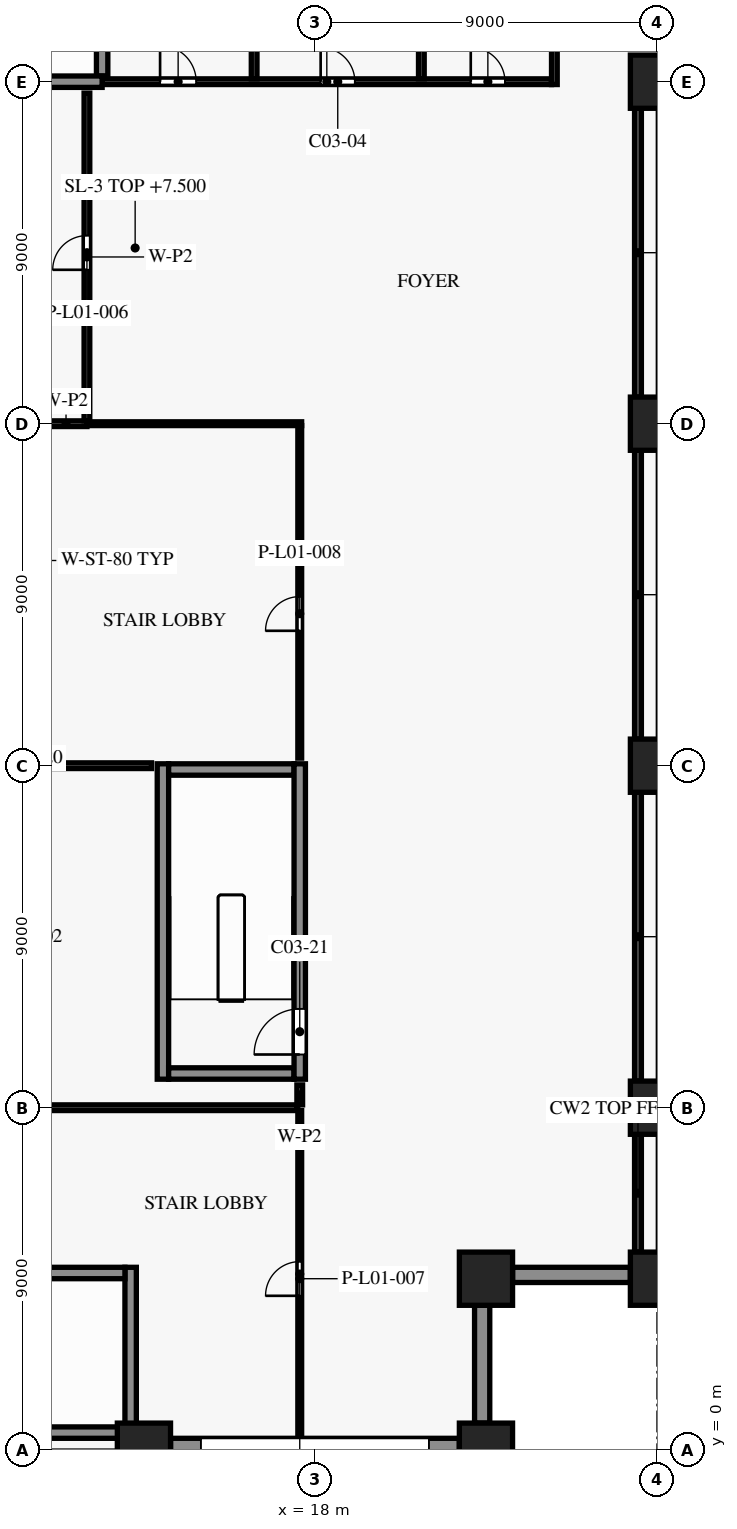
"""IFC4 building model, lengths in metres.
Left out: names, types, materials, properties, quantities, classifications, styles, units other than length and angle.
Written with IfcOpenShell. Run it as: python <this file> out.ifc"""

import sys

from ifc_helpers import new_model, si_unit, direction, frame, frame_2d, origin, origin_2d, place, context, subcontext, project, spatial, rectangle, extrude, element, fill, save


model = new_model("IFC4")
c1 = context("Model", 3, precision=1e-05, world=origin(), true_north=direction((0.0, 1.0)))
c2 = subcontext(c1, "Body", "Model", "MODEL_VIEW")
j1 = project(units=[si_unit("LENGTHUNIT", "METRE"), si_unit("PLANEANGLEUNIT", "RADIAN")], contexts=[c1])
p1 = place(None, origin())
s1 = spatial("IfcSite", under=j1, at=p1, CompositionType="ELEMENT")
p2 = place(p1, origin())
s2 = spatial("IfcBuilding", under=s1, at=p2, CompositionType="ELEMENT")
p3 = place(p2, frame((0.0, 0.0, 7.5)))
s3 = spatial("IfcBuildingStorey", under=s2, at=p3, CompositionType="ELEMENT", Elevation=7.5)
for number, where, z_axis, x_axis in (
    (1, (13.5, 0.0, 0.0), (0.0, 0.0, 1.0), (1.0, 0.0, 0.0)),
    (2, (22.5, 0.0, 0.0), (0.0, 0.0, 1.0), (1.0, 0.0, 0.0)),
    (3, (27.0, 4.5, 0.0), (0.0, 0.0, 1.0), (1.0, 0.0, 0.0)),
    (4, (27.0, 9.0, 0.0), (0.0, 0.0, 1.0), (1.0, 0.0, 0.0)),
    (5, (27.0, 18.0, 0.0), (0.0, 0.0, 1.0), (1.0, 0.0, 0.0)),
    (6, (27.0, 27.0, 0.0), (0.0, 0.0, 1.0), (1.0, 0.0, 0.0)),
    (7, (27.0, 36.0, 0.0), (0.0, 0.0, 1.0), (1.0, 0.0, 0.0)),
    (8, (22.5, 4.5, 0.0), (0.0, 0.0, 1.0), (1.0, 0.0, 0.0)),
):
    element("IfcColumn", number, at=place(p3, frame(where, z_axis=z_axis, x_axis=x_axis)), inside=s3, PredefinedType="COLUMN", context=c2, shape_type="SweptSolid", body=[
        extrude(rectangle(XDim=1.4, YDim=1.4, at=origin_2d()), origin(), (0.0, 0.0, 1.0), 7.0),
    ])
p4 = place(p3, frame((21.8, 0.1, 0.0), z_axis=(0.0, 0.0, 1.0), x_axis=(-1.0, 0.0, 0.0)))
e9 = element("IfcWall", 9, at=p4, inside=s3, PredefinedType="SOLIDWALL", context=c2, shape_type="SweptSolid", body=[
    extrude(rectangle(XDim=7.6, YDim=0.4, at=frame_2d((3.8, 0.0))), origin(), (0.0, 0.0, 1.0), 6.1),
])
p5 = place(p4, frame((0.8, 0.0, 0.9)))
e10 = element("IfcOpeningElement", 10, at=p5, cuts=e9, PredefinedType="OPENING", context=c2, shape_type="SweptSolid", body=[
    extrude(rectangle(XDim=6.0, YDim=1.8, at=frame_2d((3.0, 0.9))), frame((0.0, 0.21, 0.0), z_axis=(0.0, -1.0, 0.0), x_axis=(1.0, 0.0, 0.0)), (0.0, 0.0, 1.0), 0.42),
])
for number, where, z_axis, x_axis in (
    (11, (22.4, 3.8, 0.0), (0.0, 0.0, 1.0), (0.0, -1.0, 0.0)),
    (12, (26.3, 4.6, 0.0), (0.0, 0.0, 1.0), (-1.0, 0.0, 0.0)),
):
    element("IfcWall", number, at=place(p3, frame(where, z_axis=z_axis, x_axis=x_axis)), inside=s3, PredefinedType="SOLIDWALL", context=c2, shape_type="SweptSolid", body=[
        extrude(rectangle(XDim=3.1, YDim=0.4, at=frame_2d((1.55, 0.0))), origin(), (0.0, 0.0, 1.0), 6.1),
    ])
p6 = place(p3, frame((5.0, 0.45, 0.0), z_axis=(0.0, 0.0, 1.0), x_axis=(1.0, 0.0, 0.0)))
e13 = element("IfcWall", 13, at=p6, inside=s3, PredefinedType="SHEAR", context=c2, shape_type="SweptSolid", body=[
    extrude(rectangle(XDim=8.0, YDim=0.3, at=frame_2d((4.0, 0.0))), origin(), (0.0, 0.0, 1.0), 6.7),
])
p7 = place(p3, frame((5.0, 4.65, 0.0), z_axis=(0.0, 0.0, 1.0), x_axis=(1.0, 0.0, 0.0)))
e14 = element("IfcWall", 14, at=p7, inside=s3, PredefinedType="SHEAR", context=c2, shape_type="SweptSolid", body=[
    extrude(rectangle(XDim=8.0, YDim=0.3, at=frame_2d((4.0, 0.0))), origin(), (0.0, 0.0, 1.0), 6.7),
])
p8 = place(p7, frame((0.5, 0.0, 0.0)))
e15 = element("IfcOpeningElement", 15, at=p8, cuts=e14, PredefinedType="OPENING", context=c2, shape_type="SweptSolid", body=[
    extrude(rectangle(XDim=1.2, YDim=2.2, at=frame_2d((0.6, 1.1))), frame((0.0, 0.16, 0.0), z_axis=(0.0, -1.0, 0.0), x_axis=(1.0, 0.0, 0.0)), (0.0, 0.0, 1.0), 0.32),
])
for number, where, z_axis, x_axis in (
    (16, (14.15, 9.9, 0.0), (0.0, 0.0, 1.0), (1.0, 0.0, 0.0)),
    (17, (14.15, 17.9, 0.0), (0.0, 0.0, 1.0), (1.0, 0.0, 0.0)),
):
    element("IfcWall", number, at=place(p3, frame(where, z_axis=z_axis, x_axis=x_axis)), inside=s3, PredefinedType="SHEAR", context=c2, shape_type="SweptSolid", body=[
        extrude(rectangle(XDim=3.3, YDim=0.3, at=frame_2d((1.65, 0.0))), origin(), (0.0, 0.0, 1.0), 6.7),
    ])
p9 = place(p3, frame((12.4, 36.0, 0.0), z_axis=(0.0, 0.0, 1.0), x_axis=(1.0, 0.0, 0.0)))
e18 = element("IfcWall", 18, at=p9, inside=s3, PredefinedType="SHEAR", context=c2, shape_type="SweptSolid", body=[
    extrude(rectangle(XDim=11.825, YDim=0.15, at=frame_2d((5.913, 0.0))), origin(), (0.0, 0.0, 1.0), 6.7),
])
p10 = place(p9, frame((1.525, 0.0, 0.0)))
e19 = element("IfcOpeningElement", 19, at=p10, cuts=e18, PredefinedType="OPENING", context=c2, shape_type="SweptSolid", body=[
    extrude(rectangle(XDim=0.95, YDim=2.1, at=frame_2d((0.475, 1.05))), frame((0.0, 0.085, 0.0), z_axis=(0.0, -1.0, 0.0), x_axis=(1.0, 0.0, 0.0)), (0.0, 0.0, 1.0), 0.17),
])
p11 = place(p9, frame((5.75, 0.0, 0.0)))
e20 = element("IfcOpeningElement", 20, at=p11, cuts=e18, PredefinedType="OPENING", context=c2, shape_type="SweptSolid", body=[
    extrude(rectangle(XDim=0.9, YDim=2.1, at=frame_2d((0.45, 1.05))), frame((0.0, 0.085, 0.0), z_axis=(0.0, -1.0, 0.0), x_axis=(1.0, 0.0, 0.0)), (0.0, 0.0, 1.0), 0.17),
])
p12 = place(p9, frame((9.7, 0.0, 0.0)))
e21 = element("IfcOpeningElement", 21, at=p12, cuts=e18, PredefinedType="OPENING", context=c2, shape_type="SweptSolid", body=[
    extrude(rectangle(XDim=0.9, YDim=2.1, at=frame_2d((0.45, 1.05))), frame((0.0, 0.085, 0.0), z_axis=(0.0, -1.0, 0.0), x_axis=(1.0, 0.0, 0.0)), (0.0, 0.0, 1.0), 0.17),
])
p13 = place(p3, frame((4.4, 36.0, 0.0), z_axis=(0.0, 0.0, 1.0), x_axis=(1.0, 0.0, 0.0)))
e22 = element("IfcWall", 22, at=p13, inside=s3, PredefinedType="SHEAR", context=c2, shape_type="SweptSolid", body=[
    extrude(rectangle(XDim=8.0, YDim=0.3, at=frame_2d((4.0, 0.0))), origin(), (0.0, 0.0, 1.0), 6.7),
])
p14 = place(p13, frame((0.3, 0.0, 0.0)))
e23 = element("IfcOpeningElement", 23, at=p14, cuts=e22, PredefinedType="OPENING", context=c2, shape_type="SweptSolid", body=[
    extrude(rectangle(XDim=1.5, YDim=2.2, at=frame_2d((0.75, 1.1))), frame((0.0, 0.16, 0.0), z_axis=(0.0, -1.0, 0.0), x_axis=(1.0, 0.0, 0.0)), (0.0, 0.0, 1.0), 0.32),
])
p15 = place(p3, frame((12.4, 36.15, 0.0), z_axis=(0.0, 0.0, 1.0), x_axis=(0.0, 1.0, 0.0)))
e24 = element("IfcWall", 24, at=p15, inside=s3, PredefinedType="SHEAR", context=c2, shape_type="SweptSolid", body=[
    extrude(rectangle(XDim=3.725, YDim=0.3, at=frame_2d((1.863, 0.0))), origin(), (0.0, 0.0, 1.0), 6.7),
])
p16 = place(p3, frame((13.15, 0.3, 0.0), z_axis=(0.0, 0.0, 1.0), x_axis=(0.0, 1.0, 0.0)))
e25 = element("IfcWall", 25, at=p16, inside=s3, PredefinedType="SHEAR", context=c2, shape_type="SweptSolid", body=[
    extrude(rectangle(XDim=4.5, YDim=0.3, at=frame_2d((2.25, 0.0))), origin(), (0.0, 0.0, 1.0), 6.7),
])
p17 = place(p3, frame((14.0, 9.75, 0.0), z_axis=(0.0, 0.0, 1.0), x_axis=(0.0, 1.0, 0.0)))
e26 = element("IfcWall", 26, at=p17, inside=s3, PredefinedType="SHEAR", context=c2, shape_type="SweptSolid", body=[
    extrude(rectangle(XDim=8.3, YDim=0.3, at=frame_2d((4.15, 0.0))), origin(), (0.0, 0.0, 1.0), 6.7),
])
p18 = place(p3, frame((16.4, 36.075, 0.0), z_axis=(0.0, 0.0, 1.0), x_axis=(0.0, 1.0, 0.0)))
e27 = element("IfcWall", 27, at=p18, inside=s3, PredefinedType="PARTITIONING", context=c2, shape_type="SweptSolid", body=[
    extrude(rectangle(XDim=3.8, YDim=0.15, at=frame_2d((1.9, 0.0))), origin(), (0.0, 0.0, 1.0), 6.7),
])
p19 = place(p3, frame((17.6, 9.75, 0.0), z_axis=(0.0, 0.0, 1.0), x_axis=(0.0, 1.0, 0.0)))
e28 = element("IfcWall", 28, at=p19, inside=s3, PredefinedType="SHEAR", context=c2, shape_type="SweptSolid", body=[
    extrude(rectangle(XDim=8.3, YDim=0.3, at=frame_2d((4.15, 0.0))), origin(), (0.0, 0.0, 1.0), 6.7),
])
p20 = place(p19, frame((0.65, 0.0, 0.0)))
e29 = element("IfcOpeningElement", 29, at=p20, cuts=e28, PredefinedType="OPENING", context=c2, shape_type="SweptSolid", body=[
    extrude(rectangle(XDim=1.2, YDim=2.2, at=frame_2d((0.6, 1.1))), frame((0.0, 0.16, 0.0), z_axis=(0.0, -1.0, 0.0), x_axis=(1.0, 0.0, 0.0)), (0.0, 0.0, 1.0), 0.32),
])
p21 = place(p3, frame((20.8, 36.075, 0.0), z_axis=(0.0, 0.0, 1.0), x_axis=(0.0, 1.0, 0.0)))
e30 = element("IfcWall", 30, at=p21, inside=s3, PredefinedType="PARTITIONING", context=c2, shape_type="SweptSolid", body=[
    extrude(rectangle(XDim=3.8, YDim=0.15, at=frame_2d((1.9, 0.0))), origin(), (0.0, 0.0, 1.0), 6.7),
])
p22 = place(p3, frame((24.3, 35.925, 0.0), z_axis=(0.0, 0.0, 1.0), x_axis=(0.0, 1.0, 0.0)))
e31 = element("IfcWall", 31, at=p22, inside=s3, PredefinedType="SHEAR", context=c2, shape_type="SweptSolid", body=[
    extrude(rectangle(XDim=4.075, YDim=0.15, at=frame_2d((2.038, 0.0))), origin(), (0.0, 0.0, 1.0), 6.7),
])
p23 = place(p3, frame((17.6, 0.32, 0.0), z_axis=(0.0, 0.0, 1.0), x_axis=(0.0, 1.0, 0.0)))
e32 = element("IfcWall", 32, at=p23, inside=s3, PredefinedType="PARTITIONING", context=c2, shape_type="SweptSolid", body=[
    extrude(rectangle(XDim=8.605, YDim=0.1, at=frame_2d((4.302, 0.0))), origin(), (0.0, 0.0, 1.0), 5.98),
])
p24 = place(p23, frame((3.73, 0.0, 0.0)))
e33 = element("IfcOpeningElement", 33, at=p24, cuts=e32, PredefinedType="OPENING", context=c2, shape_type="SweptSolid", body=[
    extrude(rectangle(XDim=0.9, YDim=2.1, at=frame_2d((0.45, 1.05))), frame((0.0, 0.06, 0.0), z_axis=(0.0, -1.0, 0.0), x_axis=(1.0, 0.0, 0.0)), (0.0, 0.0, 1.0), 0.12),
])
p25 = place(p3, frame((0.72, 9.0, 0.0), z_axis=(0.0, 0.0, 1.0), x_axis=(1.0, 0.0, 0.0)))
e34 = element("IfcWall", 34, at=p25, inside=s3, PredefinedType="PARTITIONING", context=c2, shape_type="SweptSolid", body=[
    extrude(rectangle(XDim=16.805, YDim=0.15, at=frame_2d((8.402, 0.0))), origin(), (0.0, 0.0, 1.0), 5.98),
])
p26 = place(p3, frame((17.6, 9.075, 0.0), z_axis=(0.0, 0.0, 1.0), x_axis=(0.0, 1.0, 0.0)))
e35 = element("IfcWall", 35, at=p26, inside=s3, PredefinedType="PARTITIONING", context=c2, shape_type="SweptSolid", body=[
    extrude(rectangle(XDim=0.525, YDim=0.15, at=frame_2d((0.263, 0.0))), origin(), (0.0, 0.0, 1.0), 5.98),
])
p27 = place(p3, frame((13.7, 18.0, 0.0), z_axis=(0.0, 0.0, 1.0), x_axis=(-1.0, 0.0, 0.0)))
e36 = element("IfcWall", 36, at=p27, inside=s3, PredefinedType="PARTITIONING", context=c2, shape_type="SweptSolid", body=[
    extrude(rectangle(XDim=13.88, YDim=0.15, at=frame_2d((6.94, 0.0))), origin(), (0.0, 0.0, 1.0), 5.98),
])
p28 = place(p27, frame((10.25, 0.0, 0.0)))
e37 = element("IfcOpeningElement", 37, at=p28, cuts=e36, PredefinedType="OPENING", context=c2, shape_type="SweptSolid", body=[
    extrude(rectangle(XDim=0.9, YDim=2.1, at=frame_2d((0.45, 1.05))), frame((0.0, 0.085, 0.0), z_axis=(0.0, -1.0, 0.0), x_axis=(1.0, 0.0, 0.0)), (0.0, 0.0, 1.0), 0.17),
])
p29 = place(p3, frame((17.6, 18.2, 0.0), z_axis=(0.0, 0.0, 1.0), x_axis=(0.0, 1.0, 0.0)))
e38 = element("IfcWall", 38, at=p29, inside=s3, PredefinedType="PARTITIONING", context=c2, shape_type="SweptSolid", body=[
    extrude(rectangle(XDim=8.75, YDim=0.1, at=frame_2d((4.375, 0.0))), origin(), (0.0, 0.0, 1.0), 5.98),
])
p30 = place(p29, frame((3.35, 0.0, 0.0)))
e39 = element("IfcOpeningElement", 39, at=p30, cuts=e38, PredefinedType="OPENING", context=c2, shape_type="SweptSolid", body=[
    extrude(rectangle(XDim=0.9, YDim=2.1, at=frame_2d((0.45, 1.05))), frame((0.0, 0.06, 0.0), z_axis=(0.0, -1.0, 0.0), x_axis=(1.0, 0.0, 0.0)), (0.0, 0.0, 1.0), 0.12),
])
p31 = place(p3, frame((10.9, 27.0, 0.0), z_axis=(0.0, 0.0, 1.0), x_axis=(1.0, 0.0, 0.0)))
e40 = element("IfcWall", 40, at=p31, inside=s3, PredefinedType="PARTITIONING", context=c2, shape_type="SweptSolid", body=[
    extrude(rectangle(XDim=1.1, YDim=0.15, at=frame_2d((0.55, 0.0))), origin(), (0.0, 0.0, 1.0), 5.98),
])
p32 = place(p3, frame((17.65, 27.0, 0.0), z_axis=(0.0, 0.0, 1.0), x_axis=(-1.0, 0.0, 0.0)))
e41 = element("IfcWall", 41, at=p32, inside=s3, PredefinedType="PARTITIONING", context=c2, shape_type="SweptSolid", body=[
    extrude(rectangle(XDim=5.65, YDim=0.1, at=frame_2d((2.825, 0.0))), origin(), (0.0, 0.0, 1.0), 5.98),
])
p33 = place(p3, frame((12.0, 27.075, 0.0), z_axis=(0.0, 0.0, 1.0), x_axis=(0.0, 1.0, 0.0)))
e42 = element("IfcWall", 42, at=p33, inside=s3, PredefinedType="PARTITIONING", context=c2, shape_type="SweptSolid", body=[
    extrude(rectangle(XDim=8.625, YDim=0.15, at=frame_2d((4.312, 0.0))), origin(), (0.0, 0.0, 1.0), 5.98),
])
p34 = place(p33, frame((3.975, 0.0, 0.0)))
e43 = element("IfcOpeningElement", 43, at=p34, cuts=e42, PredefinedType="OPENING", context=c2, shape_type="SweptSolid", body=[
    extrude(rectangle(XDim=0.9, YDim=2.1, at=frame_2d((0.45, 1.05))), frame((0.0, 0.085, 0.0), z_axis=(0.0, -1.0, 0.0), x_axis=(1.0, 0.0, 0.0)), (0.0, 0.0, 1.0), 0.17),
])
p35 = place(p5, origin())
e44 = element("IfcWindow", 44, at=p35, inside=s3, PartitioningType="SINGLE_PANEL", PredefinedType="WINDOW", context=c2, shape_type="SweptSolid", body=[
    extrude(rectangle(XDim=6.0, YDim=1.8, at=frame_2d((3.0, 0.9))), frame((0.0, 0.03, 0.0), z_axis=(0.0, -1.0, 0.0), x_axis=(1.0, 0.0, 0.0)), (0.0, 0.0, 1.0), 0.06),
])
fill(e10, e44)
p36 = place(p10, origin())
e45 = element("IfcDoor", 45, at=p36, inside=s3, OperationType="SINGLE_SWING_RIGHT", PredefinedType="DOOR", context=c2, shape_type="SweptSolid", body=[
    extrude(rectangle(XDim=0.95, YDim=2.1, at=frame_2d((0.475, 1.05))), frame((0.0, 0.025, 0.0), z_axis=(0.0, -1.0, 0.0), x_axis=(1.0, 0.0, 0.0)), (0.0, 0.0, 1.0), 0.05),
])
fill(e19, e45)
p37 = place(p11, origin())
e46 = element("IfcDoor", 46, at=p37, inside=s3, OperationType="SINGLE_SWING_LEFT", PredefinedType="DOOR", context=c2, shape_type="SweptSolid", body=[
    extrude(rectangle(XDim=0.9, YDim=2.1, at=frame_2d((0.45, 1.05))), frame((0.0, 0.025, 0.0), z_axis=(0.0, -1.0, 0.0), x_axis=(1.0, 0.0, 0.0)), (0.0, 0.0, 1.0), 0.05),
])
fill(e20, e46)
p38 = place(p12, origin())
e47 = element("IfcDoor", 47, at=p38, inside=s3, OperationType="SINGLE_SWING_RIGHT", PredefinedType="DOOR", context=c2, shape_type="SweptSolid", body=[
    extrude(rectangle(XDim=0.9, YDim=2.1, at=frame_2d((0.45, 1.05))), frame((0.0, 0.025, 0.0), z_axis=(0.0, -1.0, 0.0), x_axis=(1.0, 0.0, 0.0)), (0.0, 0.0, 1.0), 0.05),
])
fill(e21, e47)
p39 = place(p20, origin())
e48 = element("IfcDoor", 48, at=p39, inside=s3, OperationType="SINGLE_SWING_LEFT", PredefinedType="DOOR", context=c2, shape_type="SweptSolid", body=[
    extrude(rectangle(XDim=1.2, YDim=2.2, at=frame_2d((0.6, 1.1))), frame((0.0, 0.025, 0.0), z_axis=(0.0, -1.0, 0.0), x_axis=(1.0, 0.0, 0.0)), (0.0, 0.0, 1.0), 0.05),
])
fill(e29, e48)
p40 = place(p34, origin())
e49 = element("IfcDoor", 49, at=p40, inside=s3, OperationType="SINGLE_SWING_RIGHT", PredefinedType="DOOR", context=c2, shape_type="SweptSolid", body=[
    extrude(rectangle(XDim=0.9, YDim=2.1, at=frame_2d((0.45, 1.05))), frame((0.0, 0.025, 0.0), z_axis=(0.0, -1.0, 0.0), x_axis=(1.0, 0.0, 0.0)), (0.0, 0.0, 1.0), 0.05),
])
fill(e43, e49)
p41 = place(p24, origin())
e50 = element("IfcDoor", 50, at=p41, inside=s3, OperationType="SINGLE_SWING_LEFT", PredefinedType="DOOR", context=c2, shape_type="SweptSolid", body=[
    extrude(rectangle(XDim=0.9, YDim=2.1, at=frame_2d((0.45, 1.05))), frame((0.0, 0.025, 0.0), z_axis=(0.0, -1.0, 0.0), x_axis=(1.0, 0.0, 0.0)), (0.0, 0.0, 1.0), 0.05),
])
fill(e33, e50)
p42 = place(p30, origin())
e51 = element("IfcDoor", 51, at=p42, inside=s3, OperationType="SINGLE_SWING_LEFT", PredefinedType="DOOR", context=c2, shape_type="SweptSolid", body=[
    extrude(rectangle(XDim=0.9, YDim=2.1, at=frame_2d((0.45, 1.05))), frame((0.0, 0.025, 0.0), z_axis=(0.0, -1.0, 0.0), x_axis=(1.0, 0.0, 0.0)), (0.0, 0.0, 1.0), 0.05),
])
fill(e39, e51)
save(model, sys.argv[1])
